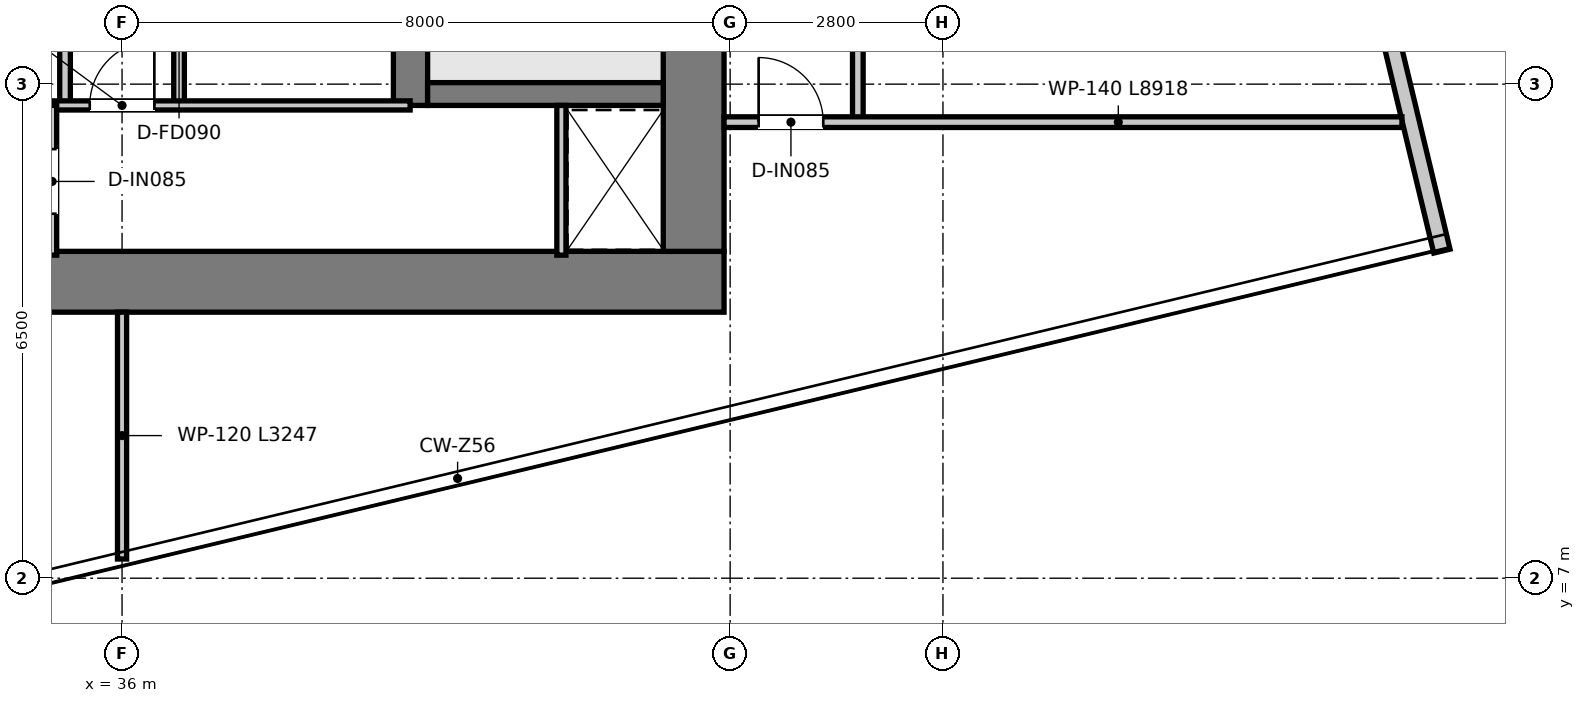
"""IFC4 building model, lengths in metres.
Left out: names, types, materials, properties, quantities, classifications, styles, units other than length and angle.
Written with IfcOpenShell. Run it as: python <this file> out.ifc"""

import sys

from ifc_helpers import new_model, si_unit, direction, frame, frame_2d, origin, place, context, subcontext, project, spatial, rectangle, extrude, element, fill, save


model = new_model("IFC4")
c1 = context("Model", 3, precision=1e-05, world=origin(), true_north=direction((0.0, 1.0)))
c2 = subcontext(c1, "Body", "Model", "MODEL_VIEW")
j1 = project(units=[si_unit("LENGTHUNIT", "METRE"), si_unit("PLANEANGLEUNIT", "RADIAN")], contexts=[c1])
p1 = place(None, origin())
s1 = spatial("IfcSite", under=j1, at=p1, CompositionType="ELEMENT")
p2 = place(p1, origin())
s2 = spatial("IfcBuilding", under=s1, at=p2, CompositionType="ELEMENT")
p3 = place(p2, frame((0.0, 0.0, 359.3)))
s3 = spatial("IfcBuildingStorey", under=s2, at=p3, CompositionType="ELEMENT", Elevation=359.3)
p4 = place(p3, frame((28.08, 10.9, 0.0), z_axis=(0.0, 0.0, 1.0), x_axis=(1.0, 0.0, 0.0)))
e1 = element("IfcWall", 1, at=p4, inside=s3, PredefinedType="SHEAR", context=c2, shape_type="SweptSolid", body=[
    extrude(rectangle(XDim=15.84, YDim=0.8, at=frame_2d((7.92, 0.0))), origin(), (0.0, 0.0, 1.0), 3.95),
])
p5 = place(p3, frame((43.52, 11.3, 0.0), z_axis=(0.0, 0.0, 1.0), x_axis=(0.0, 1.0, 0.0)))
e2 = element("IfcWall", 2, at=p5, inside=s3, PredefinedType="SHEAR", context=c2, shape_type="SweptSolid", body=[
    extrude(rectangle(XDim=14.7, YDim=0.8, at=frame_2d((7.35, 0.0))), origin(), (0.0, 0.0, 1.0), 3.95),
])
p6 = place(p3, frame((39.795, 13.22, 0.0), z_axis=(0.0, 0.0, 1.0), x_axis=(0.0, 1.0, 0.0)))
e3 = element("IfcWall", 3, at=p6, inside=s3, PredefinedType="SHEAR", context=c2, shape_type="SweptSolid", body=[
    extrude(rectangle(XDim=12.78, YDim=0.45, at=frame_2d((6.39, 0.0))), origin(), (0.0, 0.0, 1.0), 3.95),
])
p7 = place(p6, frame((10.58, 0.0, 0.0)))
e4 = element("IfcOpeningElement", 4, at=p7, cuts=e3, PredefinedType="OPENING", context=c2, shape_type="SweptSolid", body=[
    extrude(rectangle(XDim=1.1, YDim=2.15, at=frame_2d((0.55, 1.075))), frame((0.0, 0.235, 0.0), z_axis=(0.0, -1.0, 0.0), x_axis=(1.0, 0.0, 0.0)), (0.0, 0.0, 1.0), 0.47),
])
p8 = place(p3, frame((40.02, 13.37, 0.0), z_axis=(0.0, 0.0, 1.0), x_axis=(1.0, 0.0, 0.0)))
e5 = element("IfcWall", 5, at=p8, inside=s3, PredefinedType="SHEAR", context=c2, shape_type="SweptSolid", body=[
    extrude(rectangle(XDim=3.1, YDim=0.3, at=frame_2d((1.55, 0.0))), origin(), (0.0, 0.0, 1.0), 3.95),
])
p9 = place(p3, frame((53.364, 11.303, 0.0), z_axis=(0.0, 0.0, 1.0), x_axis=(-0.233453521986, 0.972367961768, 0.0)))
e6 = element("IfcWall", 6, at=p9, inside=s3, PredefinedType="ELEMENTEDWALL", context=c2, shape_type="SweptSolid", body=[
    extrude(rectangle(XDim=5.845, YDim=0.22, at=frame_2d((2.922, 0.0))), origin(), (0.0, 0.0, 1.0), 3.6),
])
p10 = place(p3, frame((35.25, 13.22, 0.0), z_axis=(0.0, 0.0, 1.0), x_axis=(0.0, 1.0, 0.0)))
e7 = element("IfcWall", 7, at=p10, inside=s3, PredefinedType="PARTITIONING", context=c2, shape_type="SweptSolid", body=[
    extrude(rectangle(XDim=4.56, YDim=0.14, at=frame_2d((2.28, 0.0))), origin(), (0.0, 0.0, 1.0), 3.6),
])
p11 = place(p10, frame((1.93, 0.0, 0.0)))
e8 = element("IfcOpeningElement", 8, at=p11, cuts=e7, PredefinedType="OPENING", context=c2, shape_type="SweptSolid", body=[
    extrude(rectangle(XDim=0.9, YDim=2.1, at=frame_2d((0.45, 1.05))), frame((0.0, 0.08, 0.0), z_axis=(0.0, -1.0, 0.0), x_axis=(1.0, 0.0, 0.0)), (0.0, 0.0, 1.0), 0.16),
])
p12 = place(p3, frame((36.75, 13.22, 0.0), z_axis=(0.0, 0.0, 1.0), x_axis=(0.0, 1.0, 0.0)))
e9 = element("IfcWall", 9, at=p12, inside=s3, PredefinedType="PARTITIONING", context=c2, shape_type="SweptSolid", body=[
    extrude(rectangle(XDim=4.56, YDim=0.14, at=frame_2d((2.28, 0.0))), origin(), (0.0, 0.0, 1.0), 3.6),
])
p13 = place(p12, frame((1.93, 0.0, 0.0)))
e10 = element("IfcOpeningElement", 10, at=p13, cuts=e9, PredefinedType="OPENING", context=c2, shape_type="SweptSolid", body=[
    extrude(rectangle(XDim=0.9, YDim=2.1, at=frame_2d((0.45, 1.05))), frame((0.0, 0.08, 0.0), z_axis=(0.0, -1.0, 0.0), x_axis=(1.0, 0.0, 0.0)), (0.0, 0.0, 1.0), 0.16),
])
p14 = place(p3, frame((41.78, 11.25, 0.0), z_axis=(0.0, 0.0, 1.0), x_axis=(0.0, 1.0, 0.0)))
e11 = element("IfcWall", 11, at=p14, inside=s3, PredefinedType="PARTITIONING", context=c2, shape_type="SweptSolid", body=[
    extrude(rectangle(XDim=1.97, YDim=0.12, at=frame_2d((0.985, 0.0))), origin(), (0.0, 0.0, 1.0), 3.6),
])
p15 = place(p3, frame((32.21, 13.22, 0.0), z_axis=(0.0, 0.0, 1.0), x_axis=(1.0, 0.0, 0.0)))
e12 = element("IfcWall", 12, at=p15, inside=s3, PredefinedType="PARTITIONING", context=c2, shape_type="SweptSolid", body=[
    extrude(rectangle(XDim=7.58, YDim=0.12, at=frame_2d((3.79, 0.0))), origin(), (0.0, 0.0, 1.0), 3.6),
])
p16 = place(p15, frame((3.365, 0.0, 0.0)))
e13 = element("IfcOpeningElement", 13, at=p16, cuts=e12, PredefinedType="OPENING", context=c2, shape_type="SweptSolid", body=[
    extrude(rectangle(XDim=0.85, YDim=2.1, at=frame_2d((0.425, 1.05))), frame((0.0, 0.07, 0.0), z_axis=(0.0, -1.0, 0.0), x_axis=(1.0, 0.0, 0.0)), (0.0, 0.0, 1.0), 0.14),
])
p17 = place(p3, frame((35.08, 11.25, 0.0), z_axis=(0.0, 0.0, 1.0), x_axis=(0.0, 1.0, 0.0)))
e14 = element("IfcWall", 14, at=p17, inside=s3, PredefinedType="PARTITIONING", context=c2, shape_type="SweptSolid", body=[
    extrude(rectangle(XDim=1.97, YDim=0.12, at=frame_2d((0.985, 0.0))), origin(), (0.0, 0.0, 1.0), 3.6),
])
p18 = place(p17, frame((0.545, 0.0, 0.0)))
e15 = element("IfcOpeningElement", 15, at=p18, cuts=e14, PredefinedType="OPENING", context=c2, shape_type="SweptSolid", body=[
    extrude(rectangle(XDim=0.85, YDim=2.1, at=frame_2d((0.425, 1.05))), frame((0.0, 0.07, 0.0), z_axis=(0.0, -1.0, 0.0), x_axis=(1.0, 0.0, 0.0)), (0.0, 0.0, 1.0), 0.14),
])
p19 = place(p3, frame((45.68, 13.0, 0.0), z_axis=(0.0, 0.0, 1.0), x_axis=(0.0, 1.0, 0.0)))
e16 = element("IfcWall", 16, at=p19, inside=s3, PredefinedType="PARTITIONING", context=c2, shape_type="SweptSolid", body=[
    extrude(rectangle(XDim=15.66, YDim=0.14, at=frame_2d((7.83, 0.0))), origin(), (0.0, 0.0, 1.0), 3.06),
])
p20 = place(p19, frame((14.3, 0.0, 0.0)))
e17 = element("IfcOpeningElement", 17, at=p20, cuts=e16, PredefinedType="OPENING", context=c2, shape_type="SweptSolid", body=[
    extrude(rectangle(XDim=0.9, YDim=2.1, at=frame_2d((0.45, 1.05))), frame((0.0, 0.08, 0.0), z_axis=(0.0, -1.0, 0.0), x_axis=(1.0, 0.0, 0.0)), (0.0, 0.0, 1.0), 0.16),
])
p21 = place(p19, frame((6.55, 0.0, 0.0)))
e18 = element("IfcOpeningElement", 18, at=p21, cuts=e16, PredefinedType="OPENING", context=c2, shape_type="SweptSolid", body=[
    extrude(rectangle(XDim=0.9, YDim=2.1, at=frame_2d((0.45, 1.05))), frame((0.0, 0.08, 0.0), z_axis=(0.0, -1.0, 0.0), x_axis=(1.0, 0.0, 0.0)), (0.0, 0.0, 1.0), 0.16),
])
p22 = place(p19, frame((11.21, 0.0, 0.0)))
e19 = element("IfcOpeningElement", 19, at=p22, cuts=e16, PredefinedType="OPENING", context=c2, shape_type="SweptSolid", body=[
    extrude(rectangle(XDim=0.9, YDim=2.1, at=frame_2d((0.45, 1.05))), frame((0.0, 0.08, 0.0), z_axis=(0.0, -1.0, 0.0), x_axis=(1.0, 0.0, 0.0)), (0.0, 0.0, 1.0), 0.16),
])
p23 = place(p3, frame((43.92, 13.0, 0.0), z_axis=(0.0, 0.0, 1.0), x_axis=(1.0, 0.0, 0.0)))
e20 = element("IfcWall", 20, at=p23, inside=s3, PredefinedType="PARTITIONING", context=c2, shape_type="SweptSolid", body=[
    extrude(rectangle(XDim=8.918, YDim=0.14, at=frame_2d((4.459, 0.0))), origin(), (0.0, 0.0, 1.0), 3.11),
])
p24 = place(p23, frame((0.455, 0.0, 0.0)))
e21 = element("IfcOpeningElement", 21, at=p24, cuts=e20, PredefinedType="OPENING", context=c2, shape_type="SweptSolid", body=[
    extrude(rectangle(XDim=0.85, YDim=2.1, at=frame_2d((0.425, 1.05))), frame((0.0, 0.08, 0.0), z_axis=(0.0, -1.0, 0.0), x_axis=(1.0, 0.0, 0.0)), (0.0, 0.0, 1.0), 0.16),
])
p25 = place(p3, frame((36.0, 7.253, 0.0), z_axis=(0.0, 0.0, 1.0), x_axis=(0.0, 1.0, 0.0)))
e22 = element("IfcWall", 22, at=p25, inside=s3, PredefinedType="PARTITIONING", context=c2, shape_type="SweptSolid", body=[
    extrude(rectangle(XDim=3.247, YDim=0.12, at=frame_2d((1.624, 0.0))), origin(), (0.0, 0.0, 1.0), 3.6),
])
p26 = place(p16, origin())
e23 = element("IfcDoor", 23, at=p26, inside=s3, OperationType="SINGLE_SWING_RIGHT", PredefinedType="DOOR", context=c2, shape_type="SweptSolid", body=[
    extrude(rectangle(XDim=0.85, YDim=2.1, at=frame_2d((0.425, 1.05))), frame((0.0, 0.025, 0.0), z_axis=(0.0, -1.0, 0.0), x_axis=(1.0, 0.0, 0.0)), (0.0, 0.0, 1.0), 0.05),
])
fill(e13, e23)
p27 = place(p18, origin())
e24 = element("IfcDoor", 24, at=p27, inside=s3, OperationType="SINGLE_SWING_LEFT", PredefinedType="DOOR", context=c2, shape_type="SweptSolid", body=[
    extrude(rectangle(XDim=0.85, YDim=2.1, at=frame_2d((0.425, 1.05))), frame((0.0, 0.025, 0.0), z_axis=(0.0, -1.0, 0.0), x_axis=(1.0, 0.0, 0.0)), (0.0, 0.0, 1.0), 0.05),
])
fill(e15, e24)
p28 = place(p24, origin())
e25 = element("IfcDoor", 25, at=p28, inside=s3, OperationType="SINGLE_SWING_LEFT", PredefinedType="DOOR", context=c2, shape_type="SweptSolid", body=[
    extrude(rectangle(XDim=0.85, YDim=2.1, at=frame_2d((0.425, 1.05))), frame((0.0, 0.025, 0.0), z_axis=(0.0, -1.0, 0.0), x_axis=(1.0, 0.0, 0.0)), (0.0, 0.0, 1.0), 0.05),
])
fill(e21, e25)
save(model, sys.argv[1])
